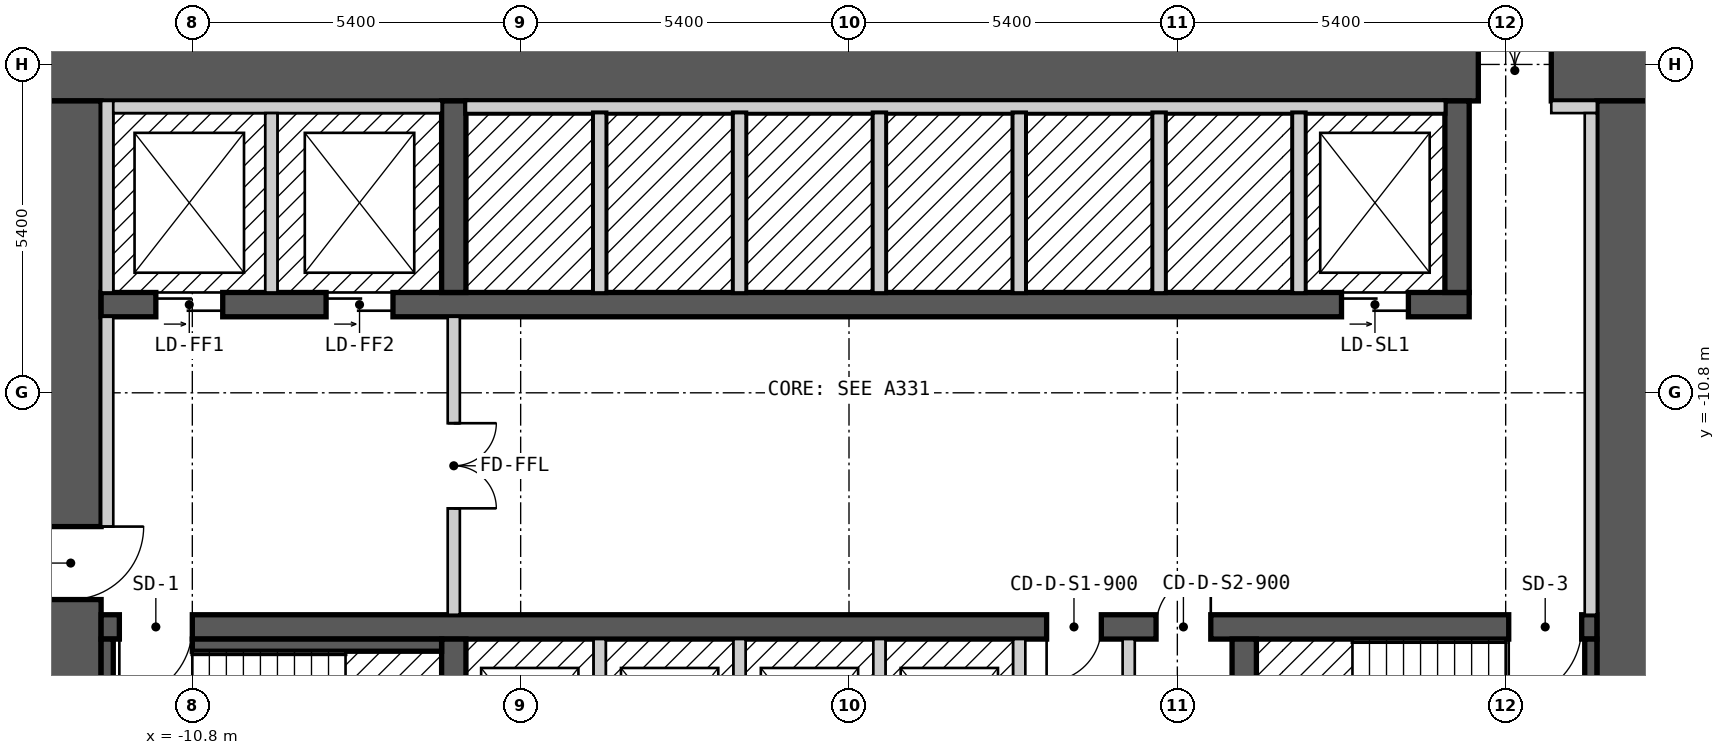
"""IFC4 building model, lengths in metres.
Left out: names, types, materials, properties, quantities, classifications, styles, units other than length and angle.
Written with IfcOpenShell. Run it as: python <this file> out.ifc"""

import sys

from ifc_helpers import new_model, si_unit, direction, frame, frame_2d, origin, place, context, subcontext, project, spatial, rectangle, extrude, element, fill, save


model = new_model("IFC4")
c1 = context("Model", 3, precision=1e-05, world=origin(), true_north=direction((0.0, 1.0)))
c2 = subcontext(c1, "Body", "Model", "MODEL_VIEW")
j1 = project(units=[si_unit("LENGTHUNIT", "METRE"), si_unit("PLANEANGLEUNIT", "RADIAN")], contexts=[c1])
p1 = place(None, origin())
s1 = spatial("IfcSite", under=j1, at=p1, CompositionType="ELEMENT")
p2 = place(p1, origin())
s2 = spatial("IfcBuilding", under=s1, at=p2, CompositionType="ELEMENT")
p3 = place(p2, frame((0.0, 0.0, 108.0)))
s3 = spatial("IfcBuildingStorey", under=s2, at=p3, CompositionType="ELEMENT", Elevation=108.0)
p4 = place(p3, frame((-13.3, -5.5, 0.0), z_axis=(0.0, 0.0, 1.0), x_axis=(1.0, 0.0, 0.0)))
e1 = element("IfcWall", 1, at=p4, inside=s3, PredefinedType="SHEAR", context=c2, shape_type="SweptSolid", body=[
    extrude(rectangle(XDim=26.6, YDim=1.0, at=frame_2d((13.3, 0.0))), origin(), (0.0, 0.0, 1.0), 2.6),
])
p5 = place(p4, frame((23.65, 0.0, 0.0)))
e2 = element("IfcOpeningElement", 2, at=p5, cuts=e1, PredefinedType="OPENING", context=c2, shape_type="SweptSolid", body=[
    extrude(rectangle(XDim=1.2, YDim=2.1, at=frame_2d((0.6, 1.05))), frame((0.0, 0.51, 0.0), z_axis=(0.0, -1.0, 0.0), x_axis=(1.0, 0.0, 0.0)), (0.0, 0.0, 1.0), 1.02),
])
p6 = place(p3, frame((-12.8, -18.0, 0.0), z_axis=(0.0, 0.0, 1.0), x_axis=(0.0, 1.0, 0.0)))
e3 = element("IfcWall", 3, at=p6, inside=s3, PredefinedType="SHEAR", context=c2, shape_type="SweptSolid", body=[
    extrude(rectangle(XDim=12.0, YDim=1.0, at=frame_2d((6.0, 0.0))), origin(), (0.0, 0.0, 1.0), 2.6),
])
p7 = place(p6, frame((3.8, 0.0, 0.0)))
e4 = element("IfcOpeningElement", 4, at=p7, cuts=e3, PredefinedType="OPENING", context=c2, shape_type="SweptSolid", body=[
    extrude(rectangle(XDim=1.2, YDim=2.1, at=frame_2d((0.6, 1.05))), frame((0.0, 0.51, 0.0), z_axis=(0.0, -1.0, 0.0), x_axis=(1.0, 0.0, 0.0)), (0.0, 0.0, 1.0), 1.02),
])
p8 = place(p3, frame((12.8, -18.0, 0.0), z_axis=(0.0, 0.0, 1.0), x_axis=(0.0, 1.0, 0.0)))
e5 = element("IfcWall", 5, at=p8, inside=s3, PredefinedType="SHEAR", context=c2, shape_type="SweptSolid", body=[
    extrude(rectangle(XDim=12.0, YDim=1.0, at=frame_2d((6.0, 0.0))), origin(), (0.0, 0.0, 1.0), 2.6),
])
p9 = place(p3, frame((-12.3, -14.65, 0.0), z_axis=(0.0, 0.0, 1.0), x_axis=(1.0, 0.0, 0.0)))
e6 = element("IfcWall", 6, at=p9, inside=s3, PredefinedType="SHEAR", context=c2, shape_type="SweptSolid", body=[
    extrude(rectangle(XDim=24.6, YDim=0.4, at=frame_2d((12.3, 0.0))), origin(), (0.0, 0.0, 1.0), 2.6),
])
p10 = place(p9, frame((1.5, 0.0, 0.0), z_axis=(0.0, 0.0, 1.0), x_axis=(-1.0, 0.0, 0.0)))
e7 = element("IfcOpeningElement", 7, at=p10, cuts=e6, PredefinedType="OPENING", context=c2, shape_type="SweptSolid", body=[
    extrude(rectangle(XDim=1.2, YDim=2.1, at=frame_2d((0.6, 1.05))), frame((0.0, 0.21, 0.0), z_axis=(0.0, -1.0, 0.0), x_axis=(1.0, 0.0, 0.0)), (0.0, 0.0, 1.0), 0.42),
])
p11 = place(p9, frame((24.35, 0.0, 0.0), z_axis=(0.0, 0.0, 1.0), x_axis=(-1.0, 0.0, 0.0)))
e8 = element("IfcOpeningElement", 8, at=p11, cuts=e6, PredefinedType="OPENING", context=c2, shape_type="SweptSolid", body=[
    extrude(rectangle(XDim=1.2, YDim=2.1, at=frame_2d((0.6, 1.05))), frame((0.0, 0.21, 0.0), z_axis=(0.0, -1.0, 0.0), x_axis=(1.0, 0.0, 0.0)), (0.0, 0.0, 1.0), 0.42),
])
p12 = place(p9, frame((16.45, 0.0, 0.0), z_axis=(0.0, 0.0, 1.0), x_axis=(-1.0, 0.0, 0.0)))
e9 = element("IfcOpeningElement", 9, at=p12, cuts=e6, PredefinedType="OPENING", context=c2, shape_type="SweptSolid", body=[
    extrude(rectangle(XDim=0.9, YDim=2.1, at=frame_2d((0.45, 1.05))), frame((0.0, 0.21, 0.0), z_axis=(0.0, -1.0, 0.0), x_axis=(1.0, 0.0, 0.0)), (0.0, 0.0, 1.0), 0.42),
])
p13 = place(p9, frame((18.25, 0.0, 0.0), z_axis=(0.0, 0.0, 1.0), x_axis=(-1.0, 0.0, 0.0)))
e10 = element("IfcOpeningElement", 10, at=p13, cuts=e6, PredefinedType="OPENING", context=c2, shape_type="SweptSolid", body=[
    extrude(rectangle(XDim=0.9, YDim=2.1, at=frame_2d((0.45, 1.05))), frame((0.0, 0.21, 0.0), z_axis=(0.0, -1.0, 0.0), x_axis=(1.0, 0.0, 0.0)), (0.0, 0.0, 1.0), 0.42),
])
p14 = place(p3, frame((-12.3, -9.35, 0.0), z_axis=(0.0, 0.0, 1.0), x_axis=(1.0, 0.0, 0.0)))
e11 = element("IfcWall", 11, at=p14, inside=s3, PredefinedType="SHEAR", context=c2, shape_type="SweptSolid", body=[
    extrude(rectangle(XDim=22.5, YDim=0.4, at=frame_2d((11.25, 0.0))), origin(), (0.0, 0.0, 1.0), 2.6),
])
p15 = place(p14, frame((0.9, 0.0, 0.0)))
e12 = element("IfcOpeningElement", 12, at=p15, cuts=e11, PredefinedType="OPENING", context=c2, shape_type="SweptSolid", body=[
    extrude(rectangle(XDim=1.1, YDim=2.1, at=frame_2d((0.55, 1.05))), frame((0.0, 0.21, 0.0), z_axis=(0.0, -1.0, 0.0), x_axis=(1.0, 0.0, 0.0)), (0.0, 0.0, 1.0), 0.42),
])
p16 = place(p14, frame((3.7, 0.0, 0.0)))
e13 = element("IfcOpeningElement", 13, at=p16, cuts=e11, PredefinedType="OPENING", context=c2, shape_type="SweptSolid", body=[
    extrude(rectangle(XDim=1.1, YDim=2.1, at=frame_2d((0.55, 1.05))), frame((0.0, 0.21, 0.0), z_axis=(0.0, -1.0, 0.0), x_axis=(1.0, 0.0, 0.0)), (0.0, 0.0, 1.0), 0.42),
])
p17 = place(p14, frame((20.4, 0.0, 0.0)))
e14 = element("IfcOpeningElement", 14, at=p17, cuts=e11, PredefinedType="OPENING", context=c2, shape_type="SweptSolid", body=[
    extrude(rectangle(XDim=1.1, YDim=2.1, at=frame_2d((0.55, 1.05))), frame((0.0, 0.21, 0.0), z_axis=(0.0, -1.0, 0.0), x_axis=(1.0, 0.0, 0.0)), (0.0, 0.0, 1.0), 0.42),
])
for number, where, z_axis, x_axis in (
    (15, (-6.5, -18.0, 0.0), (0.0, 0.0, 1.0), (0.0, 1.0, 0.0)),
    (16, (6.5, -18.0, 0.0), (0.0, 0.0, 1.0), (0.0, 1.0, 0.0)),
    (17, (-6.5, -9.15, 0.0), (0.0, 0.0, 1.0), (0.0, 1.0, 0.0)),
    (18, (10.0, -9.15, 0.0), (0.0, 0.0, 1.0), (0.0, 1.0, 0.0)),
):
    element("IfcWall", number, at=place(p3, frame(where, z_axis=z_axis, x_axis=x_axis)), inside=s3, PredefinedType="SHEAR", context=c2, shape_type="SweptSolid", body=[
        extrude(rectangle(XDim=3.15, YDim=0.4, at=frame_2d((1.575, 0.0))), origin(), (0.0, 0.0, 1.0), 2.6),
    ])
p18 = place(p3, frame((-12.2, -18.0, 0.0), z_axis=(0.0, 0.0, 1.0), x_axis=(0.0, 1.0, 0.0)))
e19 = element("IfcWall", 19, at=p18, inside=s3, PredefinedType="SOLIDWALL", context=c2, shape_type="SweptSolid", body=[
    extrude(rectangle(XDim=3.15, YDim=0.2, at=frame_2d((1.575, 0.0))), origin(), (0.0, 0.0, 1.0), 2.6),
])
p19 = place(p3, frame((-12.2, -13.0, 0.0), z_axis=(0.0, 0.0, 1.0), x_axis=(0.0, 1.0, 0.0)))
e20 = element("IfcWall", 20, at=p19, inside=s3, PredefinedType="PARTITIONING", context=c2, shape_type="SweptSolid", body=[
    extrude(rectangle(XDim=3.45, YDim=0.2, at=frame_2d((1.725, 0.0))), origin(), (0.0, 0.0, 1.0), 2.6),
])
p20 = place(p3, frame((-12.2, -9.15, 0.0), z_axis=(0.0, 0.0, 1.0), x_axis=(0.0, 1.0, 0.0)))
e21 = element("IfcWall", 21, at=p20, inside=s3, PredefinedType="SOLIDWALL", context=c2, shape_type="SweptSolid", body=[
    extrude(rectangle(XDim=3.15, YDim=0.2, at=frame_2d((1.575, 0.0))), origin(), (0.0, 0.0, 1.0), 2.6),
])
p21 = place(p3, frame((-12.1, -6.1, 0.0), z_axis=(0.0, 0.0, 1.0), x_axis=(1.0, 0.0, 0.0)))
e22 = element("IfcWall", 22, at=p21, inside=s3, PredefinedType="SOLIDWALL", context=c2, shape_type="SweptSolid", body=[
    extrude(rectangle(XDim=5.4, YDim=0.2, at=frame_2d((2.7, 0.0))), origin(), (0.0, 0.0, 1.0), 2.6),
])
p22 = place(p3, frame((-10.8, -14.95, 0.0), z_axis=(0.0, 0.0, 1.0), x_axis=(1.0, 0.0, 0.0)))
e23 = element("IfcWall", 23, at=p22, inside=s3, PredefinedType="SOLIDWALL", context=c2, shape_type="SweptSolid", body=[
    extrude(rectangle(XDim=4.1, YDim=0.2, at=frame_2d((2.05, 0.0))), origin(), (0.0, 0.0, 1.0), 2.6),
])
p23 = place(p3, frame((-9.5, -9.15, 0.0), z_axis=(0.0, 0.0, 1.0), x_axis=(0.0, 1.0, 0.0)))
e24 = element("IfcWall", 24, at=p23, inside=s3, PredefinedType="SOLIDWALL", context=c2, shape_type="SweptSolid", body=[
    extrude(rectangle(XDim=2.95, YDim=0.2, at=frame_2d((1.475, 0.0))), origin(), (0.0, 0.0, 1.0), 2.6),
])
p24 = place(p3, frame((-6.5, -14.45, 0.0), z_axis=(0.0, 0.0, 1.0), x_axis=(0.0, 1.0, 0.0)))
e25 = element("IfcWall", 25, at=p24, inside=s3, PredefinedType="PARTITIONING", context=c2, shape_type="SweptSolid", body=[
    extrude(rectangle(XDim=4.9, YDim=0.2, at=frame_2d((2.45, 0.0))), origin(), (0.0, 0.0, 1.0), 2.6),
])
p25 = place(p24, frame((3.15, 0.0, 0.0), z_axis=(0.0, 0.0, 1.0), x_axis=(-1.0, 0.0, 0.0)))
e26 = element("IfcOpeningElement", 26, at=p25, cuts=e25, PredefinedType="OPENING", context=c2, shape_type="SweptSolid", body=[
    extrude(rectangle(XDim=1.4, YDim=2.1, at=frame_2d((0.7, 1.05))), frame((0.0, 0.11, 0.0), z_axis=(0.0, -1.0, 0.0), x_axis=(1.0, 0.0, 0.0)), (0.0, 0.0, 1.0), 0.22),
])
p26 = place(p3, frame((-6.3, -6.1, 0.0), z_axis=(0.0, 0.0, 1.0), x_axis=(1.0, 0.0, 0.0)))
e27 = element("IfcWall", 27, at=p26, inside=s3, PredefinedType="SOLIDWALL", context=c2, shape_type="SweptSolid", body=[
    extrude(rectangle(XDim=16.1, YDim=0.2, at=frame_2d((8.05, 0.0))), origin(), (0.0, 0.0, 1.0), 1.4),
])
p27 = place(p3, frame((-6.3, -6.1, 1.7), z_axis=(0.0, 0.0, 1.0), x_axis=(1.0, 0.0, 0.0)))
e28 = element("IfcWall", 28, at=p27, inside=s3, PredefinedType="SOLIDWALL", context=c2, shape_type="SweptSolid", body=[
    extrude(rectangle(XDim=16.1, YDim=0.2, at=frame_2d((8.05, 0.0))), origin(), (0.0, 0.0, 1.0), 0.9),
])
p28 = place(p3, frame((-4.1, -17.8, 0.0), z_axis=(0.0, 0.0, 1.0), x_axis=(0.0, 1.0, 0.0)))
e29 = element("IfcWall", 29, at=p28, inside=s3, PredefinedType="SOLIDWALL", context=c2, shape_type="SweptSolid", body=[
    extrude(rectangle(XDim=2.95, YDim=0.2, at=frame_2d((1.475, 0.0))), origin(), (0.0, 0.0, 1.0), 2.6),
])
p29 = place(p3, frame((-4.1, -9.15, 0.0), z_axis=(0.0, 0.0, 1.0), x_axis=(0.0, 1.0, 0.0)))
e30 = element("IfcWall", 30, at=p29, inside=s3, PredefinedType="SOLIDWALL", context=c2, shape_type="SweptSolid", body=[
    extrude(rectangle(XDim=2.95, YDim=0.2, at=frame_2d((1.475, 0.0))), origin(), (0.0, 0.0, 1.0), 1.4),
])
p30 = place(p3, frame((-4.1, -9.15, 1.7), z_axis=(0.0, 0.0, 1.0), x_axis=(0.0, 1.0, 0.0)))
e31 = element("IfcWall", 31, at=p30, inside=s3, PredefinedType="SOLIDWALL", context=c2, shape_type="SweptSolid", body=[
    extrude(rectangle(XDim=2.95, YDim=0.2, at=frame_2d((1.475, 0.0))), origin(), (0.0, 0.0, 1.0), 0.9),
])
p31 = place(p3, frame((-1.8, -17.8, 0.0), z_axis=(0.0, 0.0, 1.0), x_axis=(0.0, 1.0, 0.0)))
e32 = element("IfcWall", 32, at=p31, inside=s3, PredefinedType="SOLIDWALL", context=c2, shape_type="SweptSolid", body=[
    extrude(rectangle(XDim=2.95, YDim=0.2, at=frame_2d((1.475, 0.0))), origin(), (0.0, 0.0, 1.0), 2.6),
])
p32 = place(p3, frame((-1.8, -9.15, 0.0), z_axis=(0.0, 0.0, 1.0), x_axis=(0.0, 1.0, 0.0)))
e33 = element("IfcWall", 33, at=p32, inside=s3, PredefinedType="SOLIDWALL", context=c2, shape_type="SweptSolid", body=[
    extrude(rectangle(XDim=2.95, YDim=0.2, at=frame_2d((1.475, 0.0))), origin(), (0.0, 0.0, 1.0), 1.4),
])
p33 = place(p3, frame((-1.8, -9.15, 1.7), z_axis=(0.0, 0.0, 1.0), x_axis=(0.0, 1.0, 0.0)))
e34 = element("IfcWall", 34, at=p33, inside=s3, PredefinedType="SOLIDWALL", context=c2, shape_type="SweptSolid", body=[
    extrude(rectangle(XDim=2.95, YDim=0.2, at=frame_2d((1.475, 0.0))), origin(), (0.0, 0.0, 1.0), 0.9),
])
p34 = place(p3, frame((0.5, -17.8, 0.0), z_axis=(0.0, 0.0, 1.0), x_axis=(0.0, 1.0, 0.0)))
e35 = element("IfcWall", 35, at=p34, inside=s3, PredefinedType="SOLIDWALL", context=c2, shape_type="SweptSolid", body=[
    extrude(rectangle(XDim=2.95, YDim=0.2, at=frame_2d((1.475, 0.0))), origin(), (0.0, 0.0, 1.0), 2.6),
])
p35 = place(p3, frame((0.5, -9.15, 0.0), z_axis=(0.0, 0.0, 1.0), x_axis=(0.0, 1.0, 0.0)))
e36 = element("IfcWall", 36, at=p35, inside=s3, PredefinedType="SOLIDWALL", context=c2, shape_type="SweptSolid", body=[
    extrude(rectangle(XDim=2.95, YDim=0.2, at=frame_2d((1.475, 0.0))), origin(), (0.0, 0.0, 1.0), 1.4),
])
p36 = place(p3, frame((0.5, -9.15, 1.7), z_axis=(0.0, 0.0, 1.0), x_axis=(0.0, 1.0, 0.0)))
e37 = element("IfcWall", 37, at=p36, inside=s3, PredefinedType="SOLIDWALL", context=c2, shape_type="SweptSolid", body=[
    extrude(rectangle(XDim=2.95, YDim=0.2, at=frame_2d((1.475, 0.0))), origin(), (0.0, 0.0, 1.0), 0.9),
])
p37 = place(p3, frame((2.8, -17.8, 0.0), z_axis=(0.0, 0.0, 1.0), x_axis=(0.0, 1.0, 0.0)))
e38 = element("IfcWall", 38, at=p37, inside=s3, PredefinedType="SOLIDWALL", context=c2, shape_type="SweptSolid", body=[
    extrude(rectangle(XDim=2.95, YDim=0.2, at=frame_2d((1.475, 0.0))), origin(), (0.0, 0.0, 1.0), 2.6),
])
p38 = place(p3, frame((2.8, -9.15, 0.0), z_axis=(0.0, 0.0, 1.0), x_axis=(0.0, 1.0, 0.0)))
e39 = element("IfcWall", 39, at=p38, inside=s3, PredefinedType="SOLIDWALL", context=c2, shape_type="SweptSolid", body=[
    extrude(rectangle(XDim=2.95, YDim=0.2, at=frame_2d((1.475, 0.0))), origin(), (0.0, 0.0, 1.0), 1.4),
])
p39 = place(p3, frame((2.8, -9.15, 1.7), z_axis=(0.0, 0.0, 1.0), x_axis=(0.0, 1.0, 0.0)))
e40 = element("IfcWall", 40, at=p39, inside=s3, PredefinedType="SOLIDWALL", context=c2, shape_type="SweptSolid", body=[
    extrude(rectangle(XDim=2.95, YDim=0.2, at=frame_2d((1.475, 0.0))), origin(), (0.0, 0.0, 1.0), 0.9),
])
p40 = place(p3, frame((4.6, -17.8, 0.0), z_axis=(0.0, 0.0, 1.0), x_axis=(0.0, 1.0, 0.0)))
e41 = element("IfcWall", 41, at=p40, inside=s3, PredefinedType="PARTITIONING", context=c2, shape_type="SweptSolid", body=[
    extrude(rectangle(XDim=2.95, YDim=0.2, at=frame_2d((1.475, 0.0))), origin(), (0.0, 0.0, 1.0), 2.6),
])
p41 = place(p3, frame((5.1, -9.15, 0.0), z_axis=(0.0, 0.0, 1.0), x_axis=(0.0, 1.0, 0.0)))
e42 = element("IfcWall", 42, at=p41, inside=s3, PredefinedType="SOLIDWALL", context=c2, shape_type="SweptSolid", body=[
    extrude(rectangle(XDim=2.95, YDim=0.2, at=frame_2d((1.475, 0.0))), origin(), (0.0, 0.0, 1.0), 1.4),
])
p42 = place(p3, frame((5.1, -9.15, 1.7), z_axis=(0.0, 0.0, 1.0), x_axis=(0.0, 1.0, 0.0)))
e43 = element("IfcWall", 43, at=p42, inside=s3, PredefinedType="SOLIDWALL", context=c2, shape_type="SweptSolid", body=[
    extrude(rectangle(XDim=2.95, YDim=0.2, at=frame_2d((1.475, 0.0))), origin(), (0.0, 0.0, 1.0), 0.9),
])
p43 = place(p3, frame((7.4, -9.15, 0.0), z_axis=(0.0, 0.0, 1.0), x_axis=(0.0, 1.0, 0.0)))
e44 = element("IfcWall", 44, at=p43, inside=s3, PredefinedType="SOLIDWALL", context=c2, shape_type="SweptSolid", body=[
    extrude(rectangle(XDim=2.95, YDim=0.2, at=frame_2d((1.475, 0.0))), origin(), (0.0, 0.0, 1.0), 1.4),
])
p44 = place(p3, frame((7.4, -9.15, 1.7), z_axis=(0.0, 0.0, 1.0), x_axis=(0.0, 1.0, 0.0)))
e45 = element("IfcWall", 45, at=p44, inside=s3, PredefinedType="SOLIDWALL", context=c2, shape_type="SweptSolid", body=[
    extrude(rectangle(XDim=2.95, YDim=0.2, at=frame_2d((1.475, 0.0))), origin(), (0.0, 0.0, 1.0), 0.9),
])
p45 = place(p3, frame((11.55, -6.1, 0.0), z_axis=(0.0, 0.0, 1.0), x_axis=(1.0, 0.0, 0.0)))
e46 = element("IfcWall", 46, at=p45, inside=s3, PredefinedType="PARTITIONING", context=c2, shape_type="SweptSolid", body=[
    extrude(rectangle(XDim=0.75, YDim=0.2, at=frame_2d((0.375, 0.0))), origin(), (0.0, 0.0, 1.0), 2.6),
])
p46 = place(p3, frame((12.2, -17.6, 0.0), z_axis=(0.0, 0.0, 1.0), x_axis=(0.0, 1.0, 0.0)))
e47 = element("IfcWall", 47, at=p46, inside=s3, PredefinedType="SOLIDWALL", context=c2, shape_type="SweptSolid", body=[
    extrude(rectangle(XDim=2.75, YDim=0.2, at=frame_2d((1.375, 0.0))), origin(), (0.0, 0.0, 1.0), 2.6),
])
p47 = place(p3, frame((12.2, -14.45, 0.0), z_axis=(0.0, 0.0, 1.0), x_axis=(0.0, 1.0, 0.0)))
e48 = element("IfcWall", 48, at=p47, inside=s3, PredefinedType="PARTITIONING", context=c2, shape_type="SweptSolid", body=[
    extrude(rectangle(XDim=8.25, YDim=0.2, at=frame_2d((4.125, 0.0))), origin(), (0.0, 0.0, 1.0), 2.6),
])
p48 = place(p15, origin())
e49 = element("IfcDoor", 49, at=p48, inside=s3, OperationType="DOUBLE_DOOR_SLIDING", PredefinedType="DOOR", context=c2, shape_type="SweptSolid", body=[
    extrude(rectangle(XDim=1.1, YDim=2.1, at=frame_2d((0.55, 1.05))), frame((0.0, 0.025, 0.0), z_axis=(0.0, -1.0, 0.0), x_axis=(1.0, 0.0, 0.0)), (0.0, 0.0, 1.0), 0.05),
])
fill(e12, e49)
p49 = place(p16, origin())
e50 = element("IfcDoor", 50, at=p49, inside=s3, OperationType="DOUBLE_DOOR_SLIDING", PredefinedType="DOOR", context=c2, shape_type="SweptSolid", body=[
    extrude(rectangle(XDim=1.1, YDim=2.1, at=frame_2d((0.55, 1.05))), frame((0.0, 0.025, 0.0), z_axis=(0.0, -1.0, 0.0), x_axis=(1.0, 0.0, 0.0)), (0.0, 0.0, 1.0), 0.05),
])
fill(e13, e50)
p50 = place(p17, origin())
e51 = element("IfcDoor", 51, at=p50, inside=s3, OperationType="DOUBLE_DOOR_SLIDING", PredefinedType="DOOR", context=c2, shape_type="SweptSolid", body=[
    extrude(rectangle(XDim=1.1, YDim=2.1, at=frame_2d((0.55, 1.05))), frame((0.0, 0.025, 0.0), z_axis=(0.0, -1.0, 0.0), x_axis=(1.0, 0.0, 0.0)), (0.0, 0.0, 1.0), 0.05),
])
fill(e14, e51)
p51 = place(p10, origin())
e52 = element("IfcDoor", 52, at=p51, inside=s3, OperationType="SINGLE_SWING_RIGHT", PredefinedType="DOOR", context=c2, shape_type="SweptSolid", body=[
    extrude(rectangle(XDim=1.2, YDim=2.1, at=frame_2d((0.6, 1.05))), frame((0.0, 0.025, 0.0), z_axis=(0.0, -1.0, 0.0), x_axis=(1.0, 0.0, 0.0)), (0.0, 0.0, 1.0), 0.05),
])
fill(e7, e52)
p52 = place(p11, origin())
e53 = element("IfcDoor", 53, at=p52, inside=s3, OperationType="SINGLE_SWING_RIGHT", PredefinedType="DOOR", context=c2, shape_type="SweptSolid", body=[
    extrude(rectangle(XDim=1.2, YDim=2.1, at=frame_2d((0.6, 1.05))), frame((0.0, 0.025, 0.0), z_axis=(0.0, -1.0, 0.0), x_axis=(1.0, 0.0, 0.0)), (0.0, 0.0, 1.0), 0.05),
])
fill(e8, e53)
p53 = place(p7, origin())
e54 = element("IfcDoor", 54, at=p53, inside=s3, OperationType="SINGLE_SWING_RIGHT", PredefinedType="DOOR", context=c2, shape_type="SweptSolid", body=[
    extrude(rectangle(XDim=1.2, YDim=2.1, at=frame_2d((0.6, 1.05))), frame((0.0, 0.025, 0.0), z_axis=(0.0, -1.0, 0.0), x_axis=(1.0, 0.0, 0.0)), (0.0, 0.0, 1.0), 0.05),
])
fill(e4, e54)
p54 = place(p25, origin())
e55 = element("IfcDoor", 55, at=p54, inside=s3, OperationType="DOUBLE_DOOR_SINGLE_SWING", PredefinedType="DOOR", context=c2, shape_type="SweptSolid", body=[
    extrude(rectangle(XDim=1.4, YDim=2.1, at=frame_2d((0.7, 1.05))), frame((0.0, 0.025, 0.0), z_axis=(0.0, -1.0, 0.0), x_axis=(1.0, 0.0, 0.0)), (0.0, 0.0, 1.0), 0.05),
])
fill(e26, e55)
p55 = place(p5, origin())
e56 = element("IfcDoor", 56, at=p55, inside=s3, OperationType="DOUBLE_DOOR_SINGLE_SWING", PredefinedType="DOOR", context=c2, shape_type="SweptSolid", body=[
    extrude(rectangle(XDim=1.2, YDim=2.1, at=frame_2d((0.6, 1.05))), frame((0.0, 0.025, 0.0), z_axis=(0.0, -1.0, 0.0), x_axis=(1.0, 0.0, 0.0)), (0.0, 0.0, 1.0), 0.05),
])
fill(e2, e56)
p56 = place(p12, origin())
e57 = element("IfcDoor", 57, at=p56, inside=s3, OperationType="SINGLE_SWING_RIGHT", PredefinedType="DOOR", context=c2, shape_type="SweptSolid", body=[
    extrude(rectangle(XDim=0.9, YDim=2.1, at=frame_2d((0.45, 1.05))), frame((0.0, 0.025, 0.0), z_axis=(0.0, -1.0, 0.0), x_axis=(1.0, 0.0, 0.0)), (0.0, 0.0, 1.0), 0.05),
])
fill(e9, e57)
p57 = place(p13, origin())
e58 = element("IfcDoor", 58, at=p57, inside=s3, OperationType="SINGLE_SWING_LEFT", PredefinedType="DOOR", context=c2, shape_type="SweptSolid", body=[
    extrude(rectangle(XDim=0.9, YDim=2.1, at=frame_2d((0.45, 1.05))), frame((0.0, 0.025, 0.0), z_axis=(0.0, -1.0, 0.0), x_axis=(1.0, 0.0, 0.0)), (0.0, 0.0, 1.0), 0.05),
])
fill(e10, e58)
save(model, sys.argv[1])
